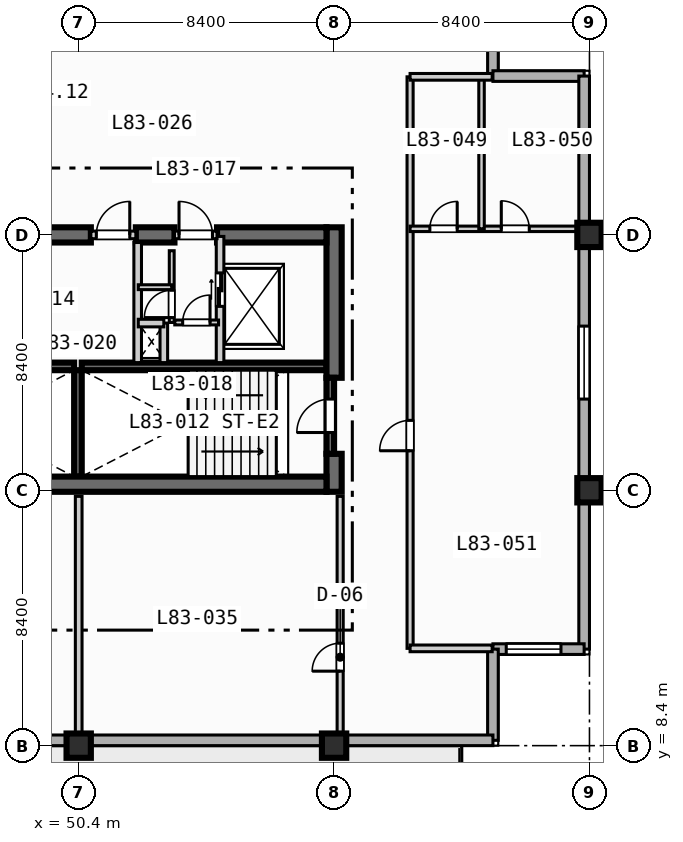
"""IFC4 building model, lengths in metres.
Left out: names, types, materials, properties, quantities, classifications, styles, units other than length and angle.
Written with IfcOpenShell. Run it as: python <this file> out.ifc"""

import sys

from ifc_helpers import new_model, si_unit, direction, frame, frame_2d, origin, origin_2d, place, context, subcontext, project, spatial, rectangle, extrude, element, fill, save


model = new_model("IFC4")
c1 = context("Model", 3, precision=1e-05, world=origin(), true_north=direction((0.0, 1.0)))
c2 = subcontext(c1, "Body", "Model", "MODEL_VIEW")
j1 = project(units=[si_unit("LENGTHUNIT", "METRE"), si_unit("PLANEANGLEUNIT", "RADIAN")], contexts=[c1])
p1 = place(None, origin())
s1 = spatial("IfcSite", under=j1, at=p1, CompositionType="ELEMENT")
p2 = place(p1, origin())
s2 = spatial("IfcBuilding", under=s1, at=p2, CompositionType="ELEMENT")
p3 = place(p2, frame((0.0, 0.0, 335.9)))
s3 = spatial("IfcBuildingStorey", under=s2, at=p3, CompositionType="ELEMENT", Elevation=335.9)
for number, where, z_axis, x_axis in (
    (1, (42.2, 20.875, 0.0), (0.0, 0.0, 1.0), (1.0, 0.0, 0.0)),
    (2, (50.5, 20.875, 0.0), (0.0, 0.0, 1.0), (1.0, 0.0, 0.0)),
):
    element("IfcWall", number, at=place(p3, frame(where, z_axis=z_axis, x_axis=x_axis)), inside=s3, PredefinedType="SOLIDWALL", context=c2, shape_type="SweptSolid", body=[
        extrude(rectangle(XDim=8.05, YDim=0.25, at=frame_2d((4.025, 0.0))), origin(), (0.0, 0.0, 1.0), 3.67),
    ])
p4 = place(p3, frame((50.375, 17.25, 0.0), z_axis=(0.0, 0.0, 1.0), x_axis=(0.0, 1.0, 0.0)))
e3 = element("IfcWall", 3, at=p4, inside=s3, PredefinedType="SOLIDWALL", context=c2, shape_type="SweptSolid", body=[
    extrude(rectangle(XDim=3.5, YDim=0.25, at=frame_2d((1.75, 0.0))), origin(), (0.0, 0.0, 1.0), 3.67),
])
p5 = place(p3, frame((58.8, 16.75, 0.0), z_axis=(0.0, 0.0, 1.0), x_axis=(0.0, 1.0, 0.0)))
e4 = element("IfcWall", 4, at=p5, inside=s3, PredefinedType="SHEAR", context=c2, shape_type="SweptSolid", body=[
    extrude(rectangle(XDim=1.25, YDim=0.5, at=frame_2d((0.625, 0.0))), origin(), (0.0, 0.0, 1.0), 3.67),
])
p6 = place(p3, frame((58.8, 20.5, 0.0), z_axis=(0.0, 0.0, 1.0), x_axis=(0.0, 1.0, 0.0)))
e5 = element("IfcWall", 5, at=p6, inside=s3, PredefinedType="SHEAR", context=c2, shape_type="SweptSolid", body=[
    extrude(rectangle(XDim=4.95, YDim=0.5, at=frame_2d((2.475, 0.0))), origin(), (0.0, 0.0, 1.0), 3.67),
])
p7 = place(p3, frame((42.2, 17.0, 0.0), z_axis=(0.0, 0.0, 1.0), x_axis=(1.0, 0.0, 0.0)))
e6 = element("IfcWall", 6, at=p7, inside=s3, PredefinedType="SHEAR", context=c2, shape_type="SweptSolid", body=[
    extrude(rectangle(XDim=16.35, YDim=0.5, at=frame_2d((8.175, 0.0))), origin(), (0.0, 0.0, 1.0), 3.67),
])
p8 = place(p3, frame((42.2, 25.2, 0.0), z_axis=(0.0, 0.0, 1.0), x_axis=(1.0, 0.0, 0.0)))
e7 = element("IfcWall", 7, at=p8, inside=s3, PredefinedType="SHEAR", context=c2, shape_type="SweptSolid", body=[
    extrude(rectangle(XDim=8.6, YDim=0.5, at=frame_2d((4.3, 0.0))), origin(), (0.0, 0.0, 1.0), 3.67),
])
p9 = place(p3, frame((52.28, 25.2, 0.0), z_axis=(0.0, 0.0, 1.0), x_axis=(1.0, 0.0, 0.0)))
e8 = element("IfcWall", 8, at=p9, inside=s3, PredefinedType="SHEAR", context=c2, shape_type="SweptSolid", body=[
    extrude(rectangle(XDim=1.27, YDim=0.5, at=frame_2d((0.635, 0.0))), origin(), (0.0, 0.0, 1.0), 3.67),
])
p10 = place(p3, frame((54.95, 25.2, 0.0), z_axis=(0.0, 0.0, 1.0), x_axis=(1.0, 0.0, 0.0)))
e9 = element("IfcWall", 9, at=p10, inside=s3, PredefinedType="SHEAR", context=c2, shape_type="SweptSolid", body=[
    extrude(rectangle(XDim=3.6, YDim=0.5, at=frame_2d((1.8, 0.0))), origin(), (0.0, 0.0, 1.0), 3.67),
])
for number, where, z_axis, x_axis in (
    (10, (50.4, 8.4, 0.0), (0.0, 0.0, 1.0), (1.0, 0.0, 0.0)),
    (11, (58.8, 8.4, 0.0), (0.0, 0.0, 1.0), (1.0, 0.0, 0.0)),
    (12, (67.2, 16.8, 0.0), (0.0, 0.0, 1.0), (1.0, 0.0, 0.0)),
    (13, (67.2, 25.2, 0.0), (0.0, 0.0, 1.0), (1.0, 0.0, 0.0)),
):
    element("IfcColumn", number, at=place(p3, frame(where, z_axis=z_axis, x_axis=x_axis)), inside=s3, PredefinedType="COLUMN", context=c2, shape_type="SweptSolid", body=[
        extrude(rectangle(XDim=0.8, YDim=0.8, at=origin_2d()), origin(), (0.0, 0.0, 1.0), 3.9),
    ])
for number, where, z_axis, x_axis in (
    (14, (64.025, 33.425, 0.0), (0.0, 0.0, 1.0), (0.0, -1.0, 0.0)),
    (15, (64.025, 30.425, 0.0), (0.0, 0.0, 1.0), (1.0, 0.0, 0.0)),
):
    element("IfcWall", number, at=place(p3, frame(where, z_axis=z_axis, x_axis=x_axis)), inside=s3, PredefinedType="STANDARD", context=c2, shape_type="SweptSolid", body=[
        extrude(rectangle(XDim=3.0, YDim=0.35, at=frame_2d((1.5, 0.0))), origin(), (0.0, 0.0, 1.0), 3.67),
    ])
p11 = place(p3, frame((67.025, 30.425, 0.0), z_axis=(0.0, 0.0, 1.0), x_axis=(0.0, -1.0, 0.0)))
e16 = element("IfcWall", 16, at=p11, inside=s3, PredefinedType="STANDARD", context=c2, shape_type="SweptSolid", body=[
    extrude(rectangle(XDim=18.85, YDim=0.35, at=frame_2d((9.425, 0.0))), origin(), (0.0, 0.0, 1.0), 3.67),
])
p12 = place(p11, frame((8.225, 0.0, 0.85)))
e17 = element("IfcOpeningElement", 17, at=p12, cuts=e16, PredefinedType="OPENING", context=c2, shape_type="SweptSolid", body=[
    extrude(rectangle(XDim=2.4, YDim=1.95, at=frame_2d((1.2, 0.975))), frame((0.0, 0.185, 0.0), z_axis=(0.0, -1.0, 0.0), x_axis=(1.0, 0.0, 0.0)), (0.0, 0.0, 1.0), 0.37),
])
p13 = place(p3, frame((67.025, 11.575, 0.0), z_axis=(0.0, 0.0, 1.0), x_axis=(-1.0, 0.0, 0.0)))
e18 = element("IfcWall", 18, at=p13, inside=s3, PredefinedType="STANDARD", context=c2, shape_type="SweptSolid", body=[
    extrude(rectangle(XDim=3.0, YDim=0.35, at=frame_2d((1.5, 0.0))), origin(), (0.0, 0.0, 1.0), 3.67),
])
p14 = place(p13, frame((0.762, 0.0, 0.85)))
e19 = element("IfcOpeningElement", 19, at=p14, cuts=e18, PredefinedType="OPENING", context=c2, shape_type="SweptSolid", body=[
    extrude(rectangle(XDim=1.8, YDim=1.8, at=frame_2d((0.9, 0.9))), frame((0.0, 0.185, 0.0), z_axis=(0.0, -1.0, 0.0), x_axis=(1.0, 0.0, 0.0)), (0.0, 0.0, 1.0), 0.37),
])
p15 = place(p3, frame((64.025, 11.575, 0.0), z_axis=(0.0, 0.0, 1.0), x_axis=(0.0, -1.0, 0.0)))
e20 = element("IfcWall", 20, at=p15, inside=s3, PredefinedType="STANDARD", context=c2, shape_type="SweptSolid", body=[
    extrude(rectangle(XDim=3.0, YDim=0.35, at=frame_2d((1.5, 0.0))), origin(), (0.0, 0.0, 1.0), 3.67),
])
p16 = place(p3, frame((64.025, 8.575, 0.0), z_axis=(0.0, 0.0, 1.0), x_axis=(-1.0, 0.0, 0.0)))
e21 = element("IfcWall", 21, at=p16, inside=s3, PredefinedType="STANDARD", context=c2, shape_type="SweptSolid", body=[
    extrude(rectangle(XDim=52.45, YDim=0.35, at=frame_2d((26.225, 0.0))), origin(), (0.0, 0.0, 1.0), 3.67),
])
p17 = place(p16, frame((33.925, 0.0, 0.0)))
e22 = element("IfcOpeningElement", 22, at=p17, cuts=e21, PredefinedType="OPENING", context=c2, shape_type="SweptSolid", body=[
    extrude(rectangle(XDim=1.4, YDim=2.2, at=frame_2d((0.7, 1.1))), frame((0.0, 0.185, 0.0), z_axis=(0.0, -1.0, 0.0), x_axis=(1.0, 0.0, 0.0)), (0.0, 0.0, 1.0), 0.37),
])
p18 = place(p16, frame((25.025, 0.0, 0.85)))
e23 = element("IfcOpeningElement", 23, at=p18, cuts=e21, PredefinedType="OPENING", context=c2, shape_type="SweptSolid", body=[
    extrude(rectangle(XDim=2.4, YDim=1.95, at=frame_2d((1.2, 0.975))), frame((0.0, 0.185, 0.0), z_axis=(0.0, -1.0, 0.0), x_axis=(1.0, 0.0, 0.0)), (0.0, 0.0, 1.0), 0.37),
])
p19 = place(p16, frame((16.925, 0.0, 0.85)))
e24 = element("IfcOpeningElement", 24, at=p19, cuts=e21, PredefinedType="OPENING", context=c2, shape_type="SweptSolid", body=[
    extrude(rectangle(XDim=1.8, YDim=1.8, at=frame_2d((0.9, 0.9))), frame((0.0, 0.185, 0.0), z_axis=(0.0, -1.0, 0.0), x_axis=(1.0, 0.0, 0.0)), (0.0, 0.0, 1.0), 0.37),
])
p20 = place(p16, frame((41.815, 0.0, 0.85)))
e25 = element("IfcOpeningElement", 25, at=p20, cuts=e21, PredefinedType="OPENING", context=c2, shape_type="SweptSolid", body=[
    extrude(rectangle(XDim=1.8, YDim=1.8, at=frame_2d((0.9, 0.9))), frame((0.0, 0.185, 0.0), z_axis=(0.0, -1.0, 0.0), x_axis=(1.0, 0.0, 0.0)), (0.0, 0.0, 1.0), 0.37),
])
p21 = place(p16, frame((49.535, 0.0, 0.85)))
e26 = element("IfcOpeningElement", 26, at=p21, cuts=e21, PredefinedType="OPENING", context=c2, shape_type="SweptSolid", body=[
    extrude(rectangle(XDim=1.8, YDim=1.8, at=frame_2d((0.9, 0.9))), frame((0.0, 0.185, 0.0), z_axis=(0.0, -1.0, 0.0), x_axis=(1.0, 0.0, 0.0)), (0.0, 0.0, 1.0), 0.37),
])
p22 = place(p3, frame((58.675, 18.0, 0.0), z_axis=(0.0, 0.0, 1.0), x_axis=(0.0, 1.0, 0.0)))
e27 = element("IfcWall", 27, at=p22, inside=s3, PredefinedType="SOLIDWALL", context=c2, shape_type="SweptSolid", body=[
    extrude(rectangle(XDim=2.5, YDim=0.25, at=frame_2d((1.25, 0.0))), origin(), (0.0, 0.0, 1.0), 3.67),
])
p23 = place(p22, frame((0.7, 0.0, 0.0)))
e28 = element("IfcOpeningElement", 28, at=p23, cuts=e27, PredefinedType="OPENING", context=c2, shape_type="SweptSolid", body=[
    extrude(rectangle(XDim=1.1, YDim=2.15, at=frame_2d((0.55, 1.075))), frame((0.0, 0.135, 0.0), z_axis=(0.0, -1.0, 0.0), x_axis=(1.0, 0.0, 0.0)), (0.0, 0.0, 1.0), 0.27),
])
p24 = place(p3, frame((50.8, 25.2, 0.0), z_axis=(0.0, 0.0, 1.0), x_axis=(1.0, 0.0, 0.0)))
e29 = element("IfcWall", 29, at=p24, inside=s3, PredefinedType="SOLIDWALL", context=c2, shape_type="SweptSolid", body=[
    extrude(rectangle(XDim=1.48, YDim=0.25, at=frame_2d((0.74, 0.0))), origin(), (0.0, 0.0, 1.0), 3.67),
])
p25 = place(p24, frame((0.18, 0.0, 0.0)))
e30 = element("IfcOpeningElement", 30, at=p25, cuts=e29, PredefinedType="OPENING", context=c2, shape_type="SweptSolid", body=[
    extrude(rectangle(XDim=1.1, YDim=2.15, at=frame_2d((0.55, 1.075))), frame((0.0, 0.135, 0.0), z_axis=(0.0, -1.0, 0.0), x_axis=(1.0, 0.0, 0.0)), (0.0, 0.0, 1.0), 0.27),
])
p26 = place(p3, frame((52.34, 21.0, 0.0), z_axis=(0.0, 0.0, 1.0), x_axis=(0.0, 1.0, 0.0)))
e31 = element("IfcWall", 31, at=p26, inside=s3, PredefinedType="SOLIDWALL", context=c2, shape_type="SweptSolid", body=[
    extrude(rectangle(XDim=3.95, YDim=0.25, at=frame_2d((1.975, 0.0))), origin(), (0.0, 0.0, 1.0), 3.67),
])
p27 = place(p3, frame((55.05, 21.0, 0.0), z_axis=(0.0, 0.0, 1.0), x_axis=(0.0, 1.0, 0.0)))
e32 = element("IfcWall", 32, at=p27, inside=s3, PredefinedType="SOLIDWALL", context=c2, shape_type="SweptSolid", body=[
    extrude(rectangle(XDim=4.15, YDim=0.25, at=frame_2d((2.075, 0.0))), origin(), (0.0, 0.0, 1.0), 3.67),
])
p28 = place(p27, frame((1.85, 0.0, 0.0)))
e33 = element("IfcOpeningElement", 33, at=p28, cuts=e32, PredefinedType="OPENING", context=c2, shape_type="SweptSolid", body=[
    extrude(rectangle(XDim=1.1, YDim=2.15, at=frame_2d((0.55, 1.075))), frame((0.0, 0.135, 0.0), z_axis=(0.0, -1.0, 0.0), x_axis=(1.0, 0.0, 0.0)), (0.0, 0.0, 1.0), 0.27),
])
p29 = place(p3, frame((53.55, 25.2, 0.0), z_axis=(0.0, 0.0, 1.0), x_axis=(1.0, 0.0, 0.0)))
e34 = element("IfcWall", 34, at=p29, inside=s3, PredefinedType="SOLIDWALL", context=c2, shape_type="SweptSolid", body=[
    extrude(rectangle(XDim=1.4, YDim=0.25, at=frame_2d((0.7, 0.0))), origin(), (0.0, 0.0, 1.0), 3.67),
])
p30 = place(p29, frame((0.15, 0.0, 0.0)))
e35 = element("IfcOpeningElement", 35, at=p30, cuts=e34, PredefinedType="OPENING", context=c2, shape_type="SweptSolid", body=[
    extrude(rectangle(XDim=1.1, YDim=2.15, at=frame_2d((0.55, 1.075))), frame((0.0, 0.135, 0.0), z_axis=(0.0, -1.0, 0.0), x_axis=(1.0, 0.0, 0.0)), (0.0, 0.0, 1.0), 0.27),
])
p31 = place(p3, frame((53.2, 21.0, 0.0), z_axis=(0.0, 0.0, 1.0), x_axis=(0.0, 1.0, 0.0)))
e36 = element("IfcWall", 36, at=p31, inside=s3, PredefinedType="SOLIDWALL", context=c2, shape_type="SweptSolid", body=[
    extrude(rectangle(XDim=1.3, YDim=0.25, at=frame_2d((0.65, 0.0))), origin(), (0.0, 0.0, 1.0), 3.67),
])
p32 = place(p3, frame((52.36, 22.3, 0.0), z_axis=(0.0, 0.0, 1.0), x_axis=(1.0, 0.0, 0.0)))
e37 = element("IfcWall", 37, at=p32, inside=s3, PredefinedType="SOLIDWALL", context=c2, shape_type="SweptSolid", body=[
    extrude(rectangle(XDim=0.84, YDim=0.25, at=frame_2d((0.42, 0.0))), origin(), (0.0, 0.0, 1.0), 3.67),
])
p33 = place(p3, frame((53.56, 22.32, 0.0), z_axis=(0.0, 0.0, 1.0), x_axis=(1.0, 0.0, 0.0)))
e38 = element("IfcWall", 38, at=p33, inside=s3, PredefinedType="PARTITIONING", context=c2, shape_type="SweptSolid", body=[
    extrude(rectangle(XDim=1.44, YDim=0.16, at=frame_2d((0.72, 0.0))), origin(), (0.0, 0.0, 1.0), 3.67),
])
p34 = place(p33, frame((0.26, 0.0, 0.0)))
e39 = element("IfcOpeningElement", 39, at=p34, cuts=e38, PredefinedType="OPENING", context=c2, shape_type="SweptSolid", body=[
    extrude(rectangle(XDim=0.9, YDim=2.1, at=frame_2d((0.45, 1.05))), frame((0.0, 0.09, 0.0), z_axis=(0.0, -1.0, 0.0), x_axis=(1.0, 0.0, 0.0)), (0.0, 0.0, 1.0), 0.18),
])
p35 = place(p3, frame((53.46, 22.32, 0.0), z_axis=(0.0, 0.0, 1.0), x_axis=(0.0, 1.0, 0.0)))
e40 = element("IfcWall", 40, at=p35, inside=s3, PredefinedType="PARTITIONING", context=c2, shape_type="SweptSolid", body=[
    extrude(rectangle(XDim=2.36, YDim=0.16, at=frame_2d((1.18, 0.0))), origin(), (0.0, 0.0, 1.0), 3.67),
])
p36 = place(p35, frame((0.16, 0.0, 0.0)))
e41 = element("IfcOpeningElement", 41, at=p36, cuts=e40, PredefinedType="OPENING", context=c2, shape_type="SweptSolid", body=[
    extrude(rectangle(XDim=0.9, YDim=2.1, at=frame_2d((0.45, 1.05))), frame((0.0, 0.09, 0.0), z_axis=(0.0, -1.0, 0.0), x_axis=(1.0, 0.0, 0.0)), (0.0, 0.0, 1.0), 0.18),
])
p37 = place(p3, frame((52.36, 23.48, 0.0), z_axis=(0.0, 0.0, 1.0), x_axis=(1.0, 0.0, 0.0)))
e42 = element("IfcWall", 42, at=p37, inside=s3, PredefinedType="PARTITIONING", context=c2, shape_type="SweptSolid", body=[
    extrude(rectangle(XDim=1.1, YDim=0.16, at=frame_2d((0.55, 0.0))), origin(), (0.0, 0.0, 1.0), 3.67),
])
p38 = place(p3, frame((59.0, 8.65, 0.0), z_axis=(0.0, 0.0, 1.0), x_axis=(0.0, 1.0, 0.0)))
e43 = element("IfcWall", 43, at=p38, inside=s3, PredefinedType="PARTITIONING", context=c2, shape_type="SweptSolid", body=[
    extrude(rectangle(XDim=7.95, YDim=0.2, at=frame_2d((3.975, 0.0))), origin(), (0.0, 0.0, 1.0), 3.07),
])
p39 = place(p38, frame((2.2, 0.0, 0.0)))
e44 = element("IfcOpeningElement", 44, at=p39, cuts=e43, PredefinedType="OPENING", context=c2, shape_type="SweptSolid", body=[
    extrude(rectangle(XDim=0.92, YDim=2.1, at=frame_2d((0.46, 1.05))), frame((0.0, 0.11, 0.0), z_axis=(0.0, -1.0, 0.0), x_axis=(1.0, 0.0, 0.0)), (0.0, 0.0, 1.0), 0.22),
])
p40 = place(p3, frame((50.4, 8.65, 0.0), z_axis=(0.0, 0.0, 1.0), x_axis=(0.0, 1.0, 0.0)))
e45 = element("IfcWall", 45, at=p40, inside=s3, PredefinedType="PARTITIONING", context=c2, shape_type="SweptSolid", body=[
    extrude(rectangle(XDim=7.95, YDim=0.22, at=frame_2d((3.975, 0.0))), origin(), (0.0, 0.0, 1.0), 3.207),
])
p41 = place(p3, frame((61.3, 11.6, 0.0), z_axis=(0.0, 0.0, 1.0), x_axis=(0.0, 1.0, 0.0)))
e46 = element("IfcWall", 46, at=p41, inside=s3, PredefinedType="PARTITIONING", context=c2, shape_type="SweptSolid", body=[
    extrude(rectangle(XDim=18.8, YDim=0.2, at=frame_2d((9.4, 0.0))), origin(), (0.0, 0.0, 1.0), 3.67),
])
p42 = place(p41, frame((6.5, 0.0, 0.0)))
e47 = element("IfcOpeningElement", 47, at=p42, cuts=e46, PredefinedType="OPENING", context=c2, shape_type="SweptSolid", body=[
    extrude(rectangle(XDim=1.0, YDim=2.15, at=frame_2d((0.5, 1.075))), frame((0.0, 0.11, 0.0), z_axis=(0.0, -1.0, 0.0), x_axis=(1.0, 0.0, 0.0)), (0.0, 0.0, 1.0), 0.22),
])
p43 = place(p3, frame((61.3, 25.4, 0.0), z_axis=(0.0, 0.0, 1.0), x_axis=(1.0, 0.0, 0.0)))
e48 = element("IfcWall", 48, at=p43, inside=s3, PredefinedType="PLUMBINGWALL", context=c2, shape_type="SweptSolid", body=[
    extrude(rectangle(XDim=5.5, YDim=0.18, at=frame_2d((2.75, 0.0))), origin(), (0.0, 0.0, 1.0), 3.207),
])
p44 = place(p43, frame((0.65, 0.0, 0.0)))
e49 = element("IfcOpeningElement", 49, at=p44, cuts=e48, PredefinedType="OPENING", context=c2, shape_type="SweptSolid", body=[
    extrude(rectangle(XDim=0.9, YDim=2.1, at=frame_2d((0.45, 1.05))), frame((0.0, 0.1, 0.0), z_axis=(0.0, -1.0, 0.0), x_axis=(1.0, 0.0, 0.0)), (0.0, 0.0, 1.0), 0.2),
])
p45 = place(p43, frame((3.0, 0.0, 0.0)))
e50 = element("IfcOpeningElement", 50, at=p45, cuts=e48, PredefinedType="OPENING", context=c2, shape_type="SweptSolid", body=[
    extrude(rectangle(XDim=0.92, YDim=2.1, at=frame_2d((0.46, 1.05))), frame((0.0, 0.1, 0.0), z_axis=(0.0, -1.0, 0.0), x_axis=(1.0, 0.0, 0.0)), (0.0, 0.0, 1.0), 0.2),
])
p46 = place(p3, frame((63.65, 25.4, 0.0), z_axis=(0.0, 0.0, 1.0), x_axis=(0.0, 1.0, 0.0)))
e51 = element("IfcWall", 51, at=p46, inside=s3, PredefinedType="PLUMBINGWALL", context=c2, shape_type="SweptSolid", body=[
    extrude(rectangle(XDim=5.0, YDim=0.18, at=frame_2d((2.5, 0.0))), origin(), (0.0, 0.0, 1.0), 3.67),
])
for number, where, z_axis, x_axis in (
    (52, (61.3, 11.6, 0.0), (0.0, 0.0, 1.0), (1.0, 0.0, 0.0)),
    (53, (61.3, 30.4, 0.0), (0.0, 0.0, 1.0), (1.0, 0.0, 0.0)),
):
    element("IfcWall", number, at=place(p3, frame(where, z_axis=z_axis, x_axis=x_axis)), inside=s3, PredefinedType="PARTITIONING", context=c2, shape_type="SweptSolid", body=[
        extrude(rectangle(XDim=2.7, YDim=0.22, at=frame_2d((1.35, 0.0))), origin(), (0.0, 0.0, 1.0), 3.67),
    ])
p47 = place(p12, origin())
e54 = element("IfcWindow", 54, at=p47, inside=s3, PartitioningType="SINGLE_PANEL", PredefinedType="WINDOW", context=c2, shape_type="SweptSolid", body=[
    extrude(rectangle(XDim=2.4, YDim=1.95, at=frame_2d((1.2, 0.975))), frame((0.0, 0.03, 0.0), z_axis=(0.0, -1.0, 0.0), x_axis=(1.0, 0.0, 0.0)), (0.0, 0.0, 1.0), 0.06),
])
fill(e17, e54)
p48 = place(p14, origin())
e55 = element("IfcWindow", 55, at=p48, inside=s3, PartitioningType="SINGLE_PANEL", PredefinedType="WINDOW", context=c2, shape_type="SweptSolid", body=[
    extrude(rectangle(XDim=1.8, YDim=1.8, at=frame_2d((0.9, 0.9))), frame((0.0, 0.03, 0.0), z_axis=(0.0, -1.0, 0.0), x_axis=(1.0, 0.0, 0.0)), (0.0, 0.0, 1.0), 0.06),
])
fill(e19, e55)
p49 = place(p23, origin())
e56 = element("IfcDoor", 56, at=p49, inside=s3, OperationType="SINGLE_SWING_LEFT", PredefinedType="DOOR", context=c2, shape_type="SweptSolid", body=[
    extrude(rectangle(XDim=1.1, YDim=2.15, at=frame_2d((0.55, 1.075))), frame((0.0, 0.025, 0.0), z_axis=(0.0, -1.0, 0.0), x_axis=(1.0, 0.0, 0.0)), (0.0, 0.0, 1.0), 0.05),
])
fill(e28, e56)
p50 = place(p25, origin())
e57 = element("IfcDoor", 57, at=p50, inside=s3, OperationType="SINGLE_SWING_RIGHT", PredefinedType="DOOR", context=c2, shape_type="SweptSolid", body=[
    extrude(rectangle(XDim=1.1, YDim=2.15, at=frame_2d((0.55, 1.075))), frame((0.0, 0.025, 0.0), z_axis=(0.0, -1.0, 0.0), x_axis=(1.0, 0.0, 0.0)), (0.0, 0.0, 1.0), 0.05),
])
fill(e30, e57)
p51 = place(p28, origin())
e58 = element("IfcDoor", 58, at=p51, inside=s3, OperationType="SLIDING_TO_LEFT", PredefinedType="DOOR", context=c2, shape_type="SweptSolid", body=[
    extrude(rectangle(XDim=1.1, YDim=2.15, at=frame_2d((0.55, 1.075))), frame((0.0, 0.025, 0.0), z_axis=(0.0, -1.0, 0.0), x_axis=(1.0, 0.0, 0.0)), (0.0, 0.0, 1.0), 0.05),
])
fill(e33, e58)
p52 = place(p30, origin())
e59 = element("IfcDoor", 59, at=p52, inside=s3, OperationType="SINGLE_SWING_LEFT", PredefinedType="DOOR", context=c2, shape_type="SweptSolid", body=[
    extrude(rectangle(XDim=1.1, YDim=2.15, at=frame_2d((0.55, 1.075))), frame((0.0, 0.025, 0.0), z_axis=(0.0, -1.0, 0.0), x_axis=(1.0, 0.0, 0.0)), (0.0, 0.0, 1.0), 0.05),
])
fill(e35, e59)
p53 = place(p34, origin())
e60 = element("IfcDoor", 60, at=p53, inside=s3, OperationType="SINGLE_SWING_RIGHT", PredefinedType="DOOR", context=c2, shape_type="SweptSolid", body=[
    extrude(rectangle(XDim=0.9, YDim=2.1, at=frame_2d((0.45, 1.05))), frame((0.0, 0.025, 0.0), z_axis=(0.0, -1.0, 0.0), x_axis=(1.0, 0.0, 0.0)), (0.0, 0.0, 1.0), 0.05),
])
fill(e39, e60)
p54 = place(p36, origin())
e61 = element("IfcDoor", 61, at=p54, inside=s3, OperationType="SINGLE_SWING_LEFT", PredefinedType="DOOR", context=c2, shape_type="SweptSolid", body=[
    extrude(rectangle(XDim=0.9, YDim=2.1, at=frame_2d((0.45, 1.05))), frame((0.0, 0.025, 0.0), z_axis=(0.0, -1.0, 0.0), x_axis=(1.0, 0.0, 0.0)), (0.0, 0.0, 1.0), 0.05),
])
fill(e41, e61)
p55 = place(p39, origin())
e62 = element("IfcDoor", 62, at=p55, inside=s3, OperationType="SINGLE_SWING_LEFT", PredefinedType="DOOR", context=c2, shape_type="SweptSolid", body=[
    extrude(rectangle(XDim=0.92, YDim=2.1, at=frame_2d((0.46, 1.05))), frame((0.0, 0.025, 0.0), z_axis=(0.0, -1.0, 0.0), x_axis=(1.0, 0.0, 0.0)), (0.0, 0.0, 1.0), 0.05),
])
fill(e44, e62)
p56 = place(p42, origin())
e63 = element("IfcDoor", 63, at=p56, inside=s3, OperationType="SINGLE_SWING_LEFT", PredefinedType="DOOR", context=c2, shape_type="SweptSolid", body=[
    extrude(rectangle(XDim=1.0, YDim=2.15, at=frame_2d((0.5, 1.075))), frame((0.0, 0.025, 0.0), z_axis=(0.0, -1.0, 0.0), x_axis=(1.0, 0.0, 0.0)), (0.0, 0.0, 1.0), 0.05),
])
fill(e47, e63)
p57 = place(p44, origin())
e64 = element("IfcDoor", 64, at=p57, inside=s3, OperationType="SINGLE_SWING_RIGHT", PredefinedType="DOOR", context=c2, shape_type="SweptSolid", body=[
    extrude(rectangle(XDim=0.9, YDim=2.1, at=frame_2d((0.45, 1.05))), frame((0.0, 0.025, 0.0), z_axis=(0.0, -1.0, 0.0), x_axis=(1.0, 0.0, 0.0)), (0.0, 0.0, 1.0), 0.05),
])
fill(e49, e64)
p58 = place(p45, origin())
e65 = element("IfcDoor", 65, at=p58, inside=s3, OperationType="SINGLE_SWING_LEFT", PredefinedType="DOOR", context=c2, shape_type="SweptSolid", body=[
    extrude(rectangle(XDim=0.92, YDim=2.1, at=frame_2d((0.46, 1.05))), frame((0.0, 0.025, 0.0), z_axis=(0.0, -1.0, 0.0), x_axis=(1.0, 0.0, 0.0)), (0.0, 0.0, 1.0), 0.05),
])
fill(e50, e65)
save(model, sys.argv[1])
